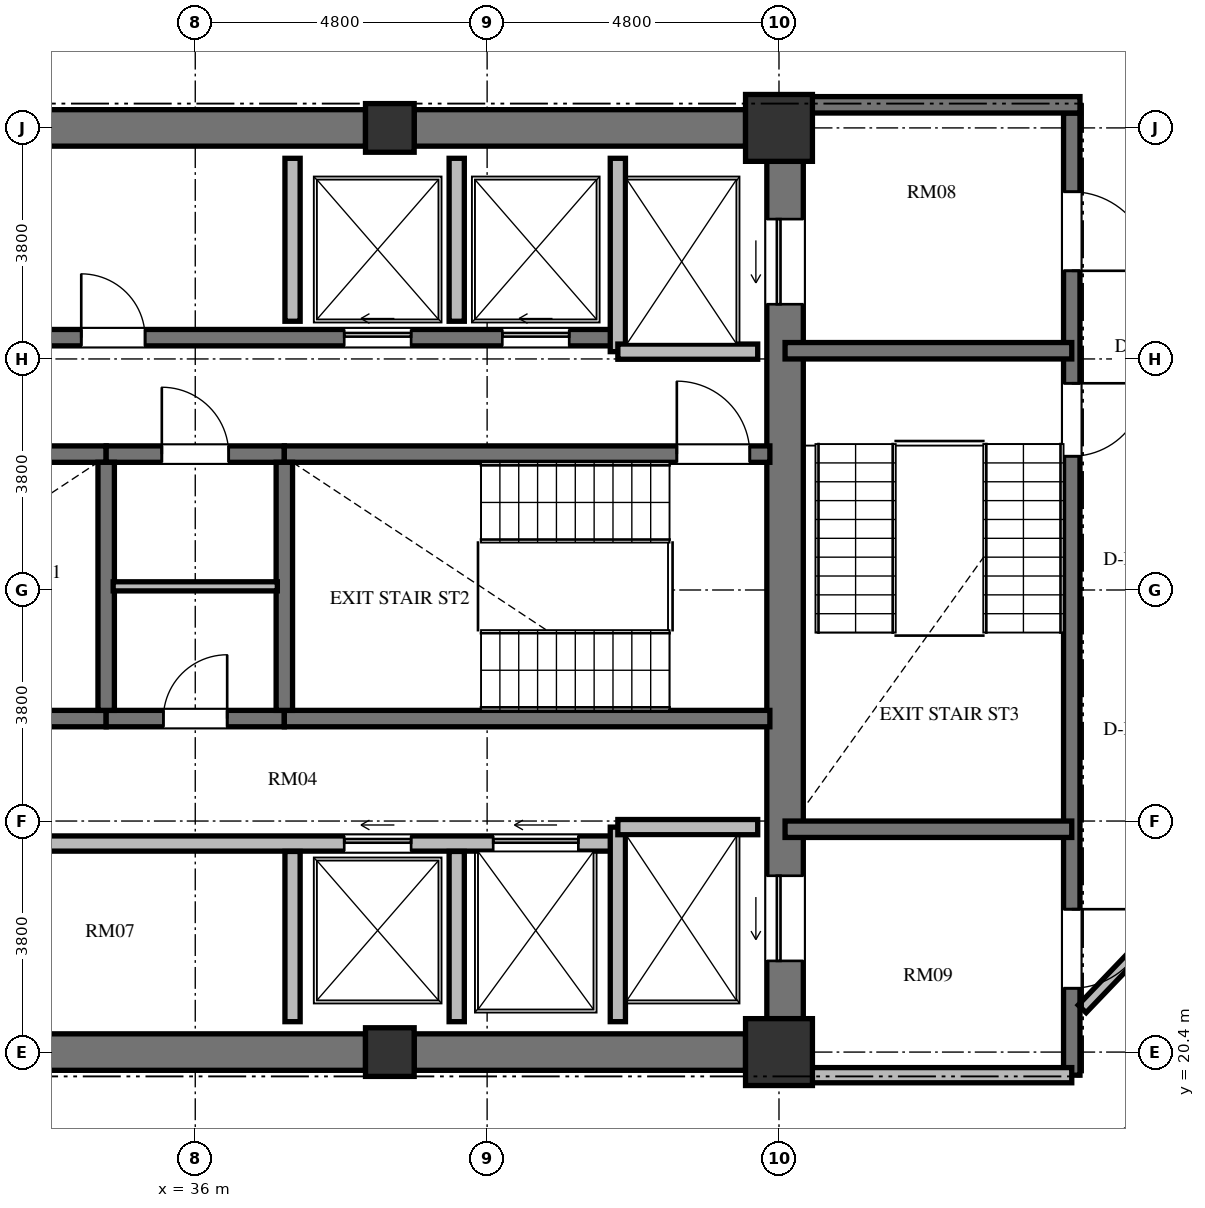
"""IFC4 building model, lengths in metres.
Left out: names, types, materials, properties, quantities, classifications, styles, units other than length and angle.
Written with IfcOpenShell. Run it as: python <this file> out.ifc"""

import sys

from ifc_helpers import new_model, si_unit, direction, frame, frame_2d, origin, origin_2d, place, context, subcontext, project, spatial, rectangle, extrude, element, fill, save


model = new_model("IFC4")
c1 = context("Model", 3, precision=1e-05, world=origin(), true_north=direction((0.0, 1.0)))
c2 = subcontext(c1, "Body", "Model", "MODEL_VIEW")
j1 = project(units=[si_unit("LENGTHUNIT", "METRE"), si_unit("PLANEANGLEUNIT", "RADIAN")], contexts=[c1])
p1 = place(None, origin())
s1 = spatial("IfcSite", under=j1, at=p1, CompositionType="ELEMENT")
p2 = place(p1, origin())
s2 = spatial("IfcBuilding", under=s1, at=p2, CompositionType="ELEMENT")
p3 = place(p2, frame((0.0, 0.0, 202.128)))
s3 = spatial("IfcBuildingStorey", under=s2, at=p3, CompositionType="ELEMENT", Elevation=202.128)
p4 = place(p3, frame((39.2, 20.4, 0.0), z_axis=(0.0, 0.0, 1.0), x_axis=(1.0, 0.0, 0.0)))
e1 = element("IfcColumn", 1, at=p4, inside=s3, PredefinedType="COLUMN", context=c2, shape_type="SweptSolid", body=[
    extrude(rectangle(XDim=0.8, YDim=0.8, at=origin_2d()), origin(), (0.0, 0.0, 1.0), 3.648),
])
for number, where, z_axis, x_axis in (
    (2, (45.6, 20.4, 0.0), (0.0, 0.0, 1.0), (1.0, 0.0, 0.0)),
    (3, (45.6, 35.6, 0.0), (0.0, 0.0, 1.0), (1.0, 0.0, 0.0)),
):
    element("IfcColumn", number, at=place(p3, frame(where, z_axis=z_axis, x_axis=x_axis)), inside=s3, PredefinedType="COLUMN", context=c2, shape_type="SweptSolid", body=[
        extrude(rectangle(XDim=1.1, YDim=1.1, at=origin_2d()), origin(), (0.0, 0.0, 1.0), 3.648),
    ])
p5 = place(p3, frame((39.2, 35.6, 0.0), z_axis=(0.0, 0.0, 1.0), x_axis=(1.0, 0.0, 0.0)))
e4 = element("IfcColumn", 4, at=p5, inside=s3, PredefinedType="COLUMN", context=c2, shape_type="SweptSolid", body=[
    extrude(rectangle(XDim=0.8, YDim=0.8, at=origin_2d()), origin(), (0.0, 0.0, 1.0), 3.648),
])
p6 = place(p3, frame((45.7, 20.95, 0.0), z_axis=(0.0, 0.0, 1.0), x_axis=(0.0, 1.0, 0.0)))
e5 = element("IfcWall", 5, at=p6, inside=s3, PredefinedType="SHEAR", context=c2, shape_type="SweptSolid", body=[
    extrude(rectangle(XDim=14.1, YDim=0.6, at=frame_2d((7.05, 0.0))), origin(), (0.0, 0.0, 1.0), 3.648),
])
p7 = place(p6, frame((11.75, 0.0, 0.0)))
e6 = element("IfcOpeningElement", 6, at=p7, cuts=e5, PredefinedType="OPENING", context=c2, shape_type="SweptSolid", body=[
    extrude(rectangle(XDim=1.4, YDim=2.3, at=frame_2d((0.7, 1.15))), frame((0.0, 0.31, 0.0), z_axis=(0.0, -1.0, 0.0), x_axis=(1.0, 0.0, 0.0)), (0.0, 0.0, 1.0), 0.62),
])
p8 = place(p6, frame((0.95, 0.0, 0.0)))
e7 = element("IfcOpeningElement", 7, at=p8, cuts=e5, PredefinedType="OPENING", context=c2, shape_type="SweptSolid", body=[
    extrude(rectangle(XDim=1.4, YDim=2.3, at=frame_2d((0.7, 1.15))), frame((0.0, 0.31, 0.0), z_axis=(0.0, -1.0, 0.0), x_axis=(1.0, 0.0, 0.0)), (0.0, 0.0, 1.0), 0.62),
])
for number, where, z_axis, x_axis in (
    (8, (33.2, 20.4, 0.0), (0.0, 0.0, 1.0), (1.0, 0.0, 0.0)),
    (9, (33.2, 35.6, 0.0), (0.0, 0.0, 1.0), (1.0, 0.0, 0.0)),
):
    element("IfcWall", number, at=place(p3, frame(where, z_axis=z_axis, x_axis=x_axis)), inside=s3, PredefinedType="SHEAR", context=c2, shape_type="SweptSolid", body=[
        extrude(rectangle(XDim=5.6, YDim=0.6, at=frame_2d((2.8, 0.0))), origin(), (0.0, 0.0, 1.0), 3.648),
    ])
for number, where, z_axis, x_axis in (
    (10, (39.6, 20.4, 0.0), (0.0, 0.0, 1.0), (1.0, 0.0, 0.0)),
    (11, (39.6, 35.6, 0.0), (0.0, 0.0, 1.0), (1.0, 0.0, 0.0)),
):
    element("IfcWall", number, at=place(p3, frame(where, z_axis=z_axis, x_axis=x_axis)), inside=s3, PredefinedType="SHEAR", context=c2, shape_type="SweptSolid", body=[
        extrude(rectangle(XDim=5.45, YDim=0.6, at=frame_2d((2.725, 0.0))), origin(), (0.0, 0.0, 1.0), 3.648),
    ])
p9 = place(p3, frame((26.55, 30.235, 0.0), z_axis=(0.0, 0.0, 1.0), x_axis=(1.0, 0.0, 0.0)))
e12 = element("IfcWall", 12, at=p9, inside=s3, PredefinedType="SHEAR", context=c2, shape_type="SweptSolid", body=[
    extrude(rectangle(XDim=7.985, YDim=0.27, at=frame_2d((3.992, 0.0))), origin(), (0.0, 0.0, 1.0), 3.648),
])
p10 = place(p3, frame((34.535, 30.235, 0.0), z_axis=(0.0, 0.0, 1.0), x_axis=(1.0, 0.0, 0.0)))
e13 = element("IfcWall", 13, at=p10, inside=s3, PredefinedType="SHEAR", context=c2, shape_type="SweptSolid", body=[
    extrude(rectangle(XDim=2.93, YDim=0.27, at=frame_2d((1.465, 0.0))), origin(), (0.0, 0.0, 1.0), 3.648),
])
p11 = place(p10, frame((0.915, 0.0, 0.0)))
e14 = element("IfcOpeningElement", 14, at=p11, cuts=e13, PredefinedType="OPENING", context=c2, shape_type="SweptSolid", body=[
    extrude(rectangle(XDim=1.1, YDim=2.15, at=frame_2d((0.55, 1.075))), frame((0.0, 0.145, 0.0), z_axis=(0.0, -1.0, 0.0), x_axis=(1.0, 0.0, 0.0)), (0.0, 0.0, 1.0), 0.29),
])
p12 = place(p3, frame((37.465, 30.235, 0.0), z_axis=(0.0, 0.0, 1.0), x_axis=(1.0, 0.0, 0.0)))
e15 = element("IfcWall", 15, at=p12, inside=s3, PredefinedType="SHEAR", context=c2, shape_type="SweptSolid", body=[
    extrude(rectangle(XDim=7.985, YDim=0.27, at=frame_2d((3.992, 0.0))), origin(), (0.0, 0.0, 1.0), 3.648),
])
p13 = place(p12, frame((6.455, 0.0, 0.0)))
e16 = element("IfcOpeningElement", 16, at=p13, cuts=e15, PredefinedType="OPENING", context=c2, shape_type="SweptSolid", body=[
    extrude(rectangle(XDim=1.2, YDim=2.15, at=frame_2d((0.6, 1.075))), frame((0.0, 0.145, 0.0), z_axis=(0.0, -1.0, 0.0), x_axis=(1.0, 0.0, 0.0)), (0.0, 0.0, 1.0), 0.29),
])
p14 = place(p3, frame((26.55, 25.885, 0.0), z_axis=(0.0, 0.0, 1.0), x_axis=(1.0, 0.0, 0.0)))
e17 = element("IfcWall", 17, at=p14, inside=s3, PredefinedType="SHEAR", context=c2, shape_type="SweptSolid", body=[
    extrude(rectangle(XDim=7.985, YDim=0.27, at=frame_2d((3.992, 0.0))), origin(), (0.0, 0.0, 1.0), 3.648),
])
p15 = place(p3, frame((34.535, 25.885, 0.0), z_axis=(0.0, 0.0, 1.0), x_axis=(1.0, 0.0, 0.0)))
e18 = element("IfcWall", 18, at=p15, inside=s3, PredefinedType="SHEAR", context=c2, shape_type="SweptSolid", body=[
    extrude(rectangle(XDim=2.93, YDim=0.27, at=frame_2d((1.465, 0.0))), origin(), (0.0, 0.0, 1.0), 3.648),
])
p16 = place(p15, frame((0.94, 0.0, 0.0)))
e19 = element("IfcOpeningElement", 19, at=p16, cuts=e18, PredefinedType="OPENING", context=c2, shape_type="SweptSolid", body=[
    extrude(rectangle(XDim=1.05, YDim=2.15, at=frame_2d((0.525, 1.075))), frame((0.0, 0.145, 0.0), z_axis=(0.0, -1.0, 0.0), x_axis=(1.0, 0.0, 0.0)), (0.0, 0.0, 1.0), 0.29),
])
p17 = place(p3, frame((37.465, 25.885, 0.0), z_axis=(0.0, 0.0, 1.0), x_axis=(1.0, 0.0, 0.0)))
e20 = element("IfcWall", 20, at=p17, inside=s3, PredefinedType="SHEAR", context=c2, shape_type="SweptSolid", body=[
    extrude(rectangle(XDim=7.985, YDim=0.27, at=frame_2d((3.992, 0.0))), origin(), (0.0, 0.0, 1.0), 3.648),
])
for number, where, z_axis, x_axis in (
    (21, (34.535, 26.02, 0.0), (0.0, 0.0, 1.0), (0.0, 1.0, 0.0)),
    (22, (37.465, 26.02, 0.0), (0.0, 0.0, 1.0), (0.0, 1.0, 0.0)),
):
    element("IfcWall", number, at=place(p3, frame(where, z_axis=z_axis, x_axis=x_axis)), inside=s3, PredefinedType="SHEAR", context=c2, shape_type="SweptSolid", body=[
        extrude(rectangle(XDim=4.08, YDim=0.27, at=frame_2d((2.04, 0.0))), origin(), (0.0, 0.0, 1.0), 3.648),
    ])
p18 = place(p3, frame((34.65, 28.06, 0.0), z_axis=(0.0, 0.0, 1.0), x_axis=(1.0, 0.0, 0.0)))
e23 = element("IfcWall", 23, at=p18, inside=s3, PredefinedType="PARTITIONING", context=c2, shape_type="SweptSolid", body=[
    extrude(rectangle(XDim=2.7, YDim=0.15, at=frame_2d((1.35, 0.0))), origin(), (0.0, 0.0, 1.0), 3.448),
])
p19 = place(p3, frame((26.55, 32.15, 0.0), z_axis=(0.0, 0.0, 1.0), x_axis=(1.0, 0.0, 0.0)))
e24 = element("IfcWall", 24, at=p19, inside=s3, PredefinedType="SHEAR", context=c2, shape_type="SweptSolid", body=[
    extrude(rectangle(XDim=16.4, YDim=0.27, at=frame_2d((8.2, 0.0))), origin(), (0.0, 0.0, 1.0), 3.648),
])
p20 = place(p19, frame((2.175, 0.0, 0.0)))
e25 = element("IfcOpeningElement", 25, at=p20, cuts=e24, PredefinedType="OPENING", context=c2, shape_type="SweptSolid", body=[
    extrude(rectangle(XDim=1.05, YDim=2.15, at=frame_2d((0.525, 1.075))), frame((0.0, 0.145, 0.0), z_axis=(0.0, -1.0, 0.0), x_axis=(1.0, 0.0, 0.0)), (0.0, 0.0, 1.0), 0.29),
])
p21 = place(p19, frame((7.575, 0.0, 0.0)))
e26 = element("IfcOpeningElement", 26, at=p21, cuts=e24, PredefinedType="OPENING", context=c2, shape_type="SweptSolid", body=[
    extrude(rectangle(XDim=1.05, YDim=2.15, at=frame_2d((0.525, 1.075))), frame((0.0, 0.145, 0.0), z_axis=(0.0, -1.0, 0.0), x_axis=(1.0, 0.0, 0.0)), (0.0, 0.0, 1.0), 0.29),
])
p22 = place(p19, frame((11.9, 0.0, 0.0)))
e27 = element("IfcOpeningElement", 27, at=p22, cuts=e24, PredefinedType="OPENING", context=c2, shape_type="SweptSolid", body=[
    extrude(rectangle(XDim=1.1, YDim=2.2, at=frame_2d((0.55, 1.1))), frame((0.0, 0.145, 0.0), z_axis=(0.0, -1.0, 0.0), x_axis=(1.0, 0.0, 0.0)), (0.0, 0.0, 1.0), 0.29),
])
p23 = place(p19, frame((14.5, 0.0, 0.0)))
e28 = element("IfcOpeningElement", 28, at=p23, cuts=e24, PredefinedType="OPENING", context=c2, shape_type="SweptSolid", body=[
    extrude(rectangle(XDim=1.1, YDim=2.2, at=frame_2d((0.55, 1.1))), frame((0.0, 0.145, 0.0), z_axis=(0.0, -1.0, 0.0), x_axis=(1.0, 0.0, 0.0)), (0.0, 0.0, 1.0), 0.29),
])
p24 = place(p3, frame((26.75, 23.83, 0.0), z_axis=(0.0, 0.0, 1.0), x_axis=(1.0, 0.0, 0.0)))
e29 = element("IfcWall", 29, at=p24, inside=s3, PredefinedType="SOLIDWALL", context=c2, shape_type="SweptSolid", body=[
    extrude(rectangle(XDim=16.2, YDim=0.25, at=frame_2d((8.1, 0.0))), origin(), (0.0, 0.0, 1.0), 3.448),
])
p25 = place(p24, frame((4.75, 0.0, 0.0)))
e30 = element("IfcOpeningElement", 30, at=p25, cuts=e29, PredefinedType="OPENING", context=c2, shape_type="SweptSolid", body=[
    extrude(rectangle(XDim=1.4, YDim=2.2, at=frame_2d((0.7, 1.1))), frame((0.0, 0.135, 0.0), z_axis=(0.0, -1.0, 0.0), x_axis=(1.0, 0.0, 0.0)), (0.0, 0.0, 1.0), 0.27),
])
p26 = place(p24, frame((11.7, 0.0, 0.0)))
e31 = element("IfcOpeningElement", 31, at=p26, cuts=e29, PredefinedType="OPENING", context=c2, shape_type="SweptSolid", body=[
    extrude(rectangle(XDim=1.1, YDim=2.2, at=frame_2d((0.55, 1.1))), frame((0.0, 0.135, 0.0), z_axis=(0.0, -1.0, 0.0), x_axis=(1.0, 0.0, 0.0)), (0.0, 0.0, 1.0), 0.27),
])
p27 = place(p24, frame((14.15, 0.0, 0.0)))
e32 = element("IfcOpeningElement", 32, at=p27, cuts=e29, PredefinedType="OPENING", context=c2, shape_type="SweptSolid", body=[
    extrude(rectangle(XDim=1.4, YDim=2.3, at=frame_2d((0.7, 1.15))), frame((0.0, 0.135, 0.0), z_axis=(0.0, -1.0, 0.0), x_axis=(1.0, 0.0, 0.0)), (0.0, 0.0, 1.0), 0.27),
])
p28 = place(p3, frame((42.95, 31.92, 0.0), z_axis=(0.0, 0.0, 1.0), x_axis=(0.0, 1.0, 0.0)))
e33 = element("IfcWall", 33, at=p28, inside=s3, PredefinedType="SOLIDWALL", context=c2, shape_type="SweptSolid", body=[
    extrude(rectangle(XDim=3.18, YDim=0.25, at=frame_2d((1.59, 0.0))), origin(), (0.0, 0.0, 1.0), 3.448),
])
p29 = place(p3, frame((42.95, 31.92, 0.0), z_axis=(0.0, 0.0, 1.0), x_axis=(1.0, 0.0, 0.0)))
e34 = element("IfcWall", 34, at=p29, inside=s3, PredefinedType="SOLIDWALL", context=c2, shape_type="SweptSolid", body=[
    extrude(rectangle(XDim=2.3, YDim=0.25, at=frame_2d((1.15, 0.0))), origin(), (0.0, 0.0, 1.0), 3.448),
])
p30 = place(p3, frame((42.95, 20.9, 0.0), z_axis=(0.0, 0.0, 1.0), x_axis=(0.0, 1.0, 0.0)))
e35 = element("IfcWall", 35, at=p30, inside=s3, PredefinedType="SOLIDWALL", context=c2, shape_type="SweptSolid", body=[
    extrude(rectangle(XDim=3.2, YDim=0.25, at=frame_2d((1.6, 0.0))), origin(), (0.0, 0.0, 1.0), 3.448),
])
p31 = place(p3, frame((42.95, 24.1, 0.0), z_axis=(0.0, 0.0, 1.0), x_axis=(1.0, 0.0, 0.0)))
e36 = element("IfcWall", 36, at=p31, inside=s3, PredefinedType="SOLIDWALL", context=c2, shape_type="SweptSolid", body=[
    extrude(rectangle(XDim=2.3, YDim=0.25, at=frame_2d((1.15, 0.0))), origin(), (0.0, 0.0, 1.0), 3.448),
])
p32 = place(p3, frame((37.6, 32.42, 0.0), z_axis=(0.0, 0.0, 1.0), x_axis=(0.0, 1.0, 0.0)))
e37 = element("IfcWall", 37, at=p32, inside=s3, PredefinedType="SOLIDWALL", context=c2, shape_type="SweptSolid", body=[
    extrude(rectangle(XDim=2.68, YDim=0.25, at=frame_2d((1.34, 0.0))), origin(), (0.0, 0.0, 1.0), 3.448),
])
p33 = place(p3, frame((37.6, 20.9, 0.0), z_axis=(0.0, 0.0, 1.0), x_axis=(0.0, 1.0, 0.0)))
e38 = element("IfcWall", 38, at=p33, inside=s3, PredefinedType="SOLIDWALL", context=c2, shape_type="SweptSolid", body=[
    extrude(rectangle(XDim=2.8, YDim=0.25, at=frame_2d((1.4, 0.0))), origin(), (0.0, 0.0, 1.0), 3.448),
])
p34 = place(p3, frame((40.3, 32.42, 0.0), z_axis=(0.0, 0.0, 1.0), x_axis=(0.0, 1.0, 0.0)))
e39 = element("IfcWall", 39, at=p34, inside=s3, PredefinedType="SOLIDWALL", context=c2, shape_type="SweptSolid", body=[
    extrude(rectangle(XDim=2.68, YDim=0.25, at=frame_2d((1.34, 0.0))), origin(), (0.0, 0.0, 1.0), 3.448),
])
p35 = place(p3, frame((40.3, 20.9, 0.0), z_axis=(0.0, 0.0, 1.0), x_axis=(0.0, 1.0, 0.0)))
e40 = element("IfcWall", 40, at=p35, inside=s3, PredefinedType="SOLIDWALL", context=c2, shape_type="SweptSolid", body=[
    extrude(rectangle(XDim=2.8, YDim=0.25, at=frame_2d((1.4, 0.0))), origin(), (0.0, 0.0, 1.0), 3.448),
])
p36 = place(p3, frame((50.415, 35.845, 0.0), z_axis=(0.0, 0.0, 1.0), x_axis=(0.0, -1.0, 0.0)))
e41 = element("IfcWall", 41, at=p36, inside=s3, PredefinedType="SHEAR", context=c2, shape_type="SweptSolid", body=[
    extrude(rectangle(XDim=15.825, YDim=0.27, at=frame_2d((7.913, 0.0))), origin(), (0.0, 0.0, 1.0), 3.648),
])
p37 = place(p36, frame((4.445, 0.0, 0.0)))
e42 = element("IfcOpeningElement", 42, at=p37, cuts=e41, PredefinedType="OPENING", context=c2, shape_type="SweptSolid", body=[
    extrude(rectangle(XDim=1.2, YDim=2.15, at=frame_2d((0.6, 1.075))), frame((0.0, 0.145, 0.0), z_axis=(0.0, -1.0, 0.0), x_axis=(1.0, 0.0, 0.0)), (0.0, 0.0, 1.0), 0.29),
])
p38 = place(p36, frame((1.295, 0.0, 0.0)))
e43 = element("IfcOpeningElement", 43, at=p38, cuts=e41, PredefinedType="OPENING", context=c2, shape_type="SweptSolid", body=[
    extrude(rectangle(XDim=1.3, YDim=2.2, at=frame_2d((0.65, 1.1))), frame((0.0, 0.145, 0.0), z_axis=(0.0, -1.0, 0.0), x_axis=(1.0, 0.0, 0.0)), (0.0, 0.0, 1.0), 0.29),
])
p39 = place(p36, frame((13.095, 0.0, 0.0)))
e44 = element("IfcOpeningElement", 44, at=p39, cuts=e41, PredefinedType="OPENING", context=c2, shape_type="SweptSolid", body=[
    extrude(rectangle(XDim=1.3, YDim=2.2, at=frame_2d((0.65, 1.1))), frame((0.0, 0.145, 0.0), z_axis=(0.0, -1.0, 0.0), x_axis=(1.0, 0.0, 0.0)), (0.0, 0.0, 1.0), 0.29),
])
p40 = place(p3, frame((46.0, 35.98, 0.0), z_axis=(0.0, 0.0, 1.0), x_axis=(1.0, 0.0, 0.0)))
e45 = element("IfcWall", 45, at=p40, inside=s3, PredefinedType="SHEAR", context=c2, shape_type="SweptSolid", body=[
    extrude(rectangle(XDim=4.55, YDim=0.27, at=frame_2d((2.275, 0.0))), origin(), (0.0, 0.0, 1.0), 3.648),
])
for number, where, z_axis, x_axis in (
    (46, (45.7, 31.935, 0.0), (0.0, 0.0, 1.0), (1.0, 0.0, 0.0)),
    (47, (45.7, 24.065, 0.0), (0.0, 0.0, 1.0), (1.0, 0.0, 0.0)),
):
    element("IfcWall", number, at=place(p3, frame(where, z_axis=z_axis, x_axis=x_axis)), inside=s3, PredefinedType="SHEAR", context=c2, shape_type="SweptSolid", body=[
        extrude(rectangle(XDim=4.715, YDim=0.27, at=frame_2d((2.357, 0.0))), origin(), (0.0, 0.0, 1.0), 3.648),
    ])
p41 = place(p3, frame((45.7, 20.02, 0.0), z_axis=(0.0, 0.0, 1.0), x_axis=(1.0, 0.0, 0.0)))
e48 = element("IfcWall", 48, at=p41, inside=s3, PredefinedType="SOLIDWALL", context=c2, shape_type="SweptSolid", body=[
    extrude(rectangle(XDim=4.715, YDim=0.25, at=frame_2d((2.357, 0.0))), origin(), (0.0, 0.0, 1.0), 3.448),
])
p42 = place(p3, frame((53.078, 23.714, 0.0), z_axis=(0.0, 0.0, 1.0), x_axis=(-0.691353379446, -0.722516785085, 0.0)))
e49 = element("IfcWall", 49, at=p42, inside=s3, PredefinedType="PARTITIONING", context=c2, shape_type="SweptSolid", body=[
    extrude(rectangle(XDim=3.604, YDim=0.18, at=frame_2d((1.802, 0.0))), origin(), (0.0, 0.0, 1.0), 3.448),
])
p43 = place(p13, origin())
e50 = element("IfcDoor", 50, at=p43, inside=s3, OperationType="SINGLE_SWING_LEFT", PredefinedType="DOOR", context=c2, shape_type="SweptSolid", body=[
    extrude(rectangle(XDim=1.2, YDim=2.15, at=frame_2d((0.6, 1.075))), frame((0.0, 0.025, 0.0), z_axis=(0.0, -1.0, 0.0), x_axis=(1.0, 0.0, 0.0)), (0.0, 0.0, 1.0), 0.05),
])
fill(e16, e50)
p44 = place(p16, origin())
e51 = element("IfcDoor", 51, at=p44, inside=s3, OperationType="SINGLE_SWING_RIGHT", PredefinedType="DOOR", context=c2, shape_type="SweptSolid", body=[
    extrude(rectangle(XDim=1.05, YDim=2.15, at=frame_2d((0.525, 1.075))), frame((0.0, 0.025, 0.0), z_axis=(0.0, -1.0, 0.0), x_axis=(1.0, 0.0, 0.0)), (0.0, 0.0, 1.0), 0.05),
])
fill(e19, e51)
p45 = place(p11, origin())
e52 = element("IfcDoor", 52, at=p45, inside=s3, OperationType="SINGLE_SWING_LEFT", PredefinedType="DOOR", context=c2, shape_type="SweptSolid", body=[
    extrude(rectangle(XDim=1.1, YDim=2.15, at=frame_2d((0.55, 1.075))), frame((0.0, 0.025, 0.0), z_axis=(0.0, -1.0, 0.0), x_axis=(1.0, 0.0, 0.0)), (0.0, 0.0, 1.0), 0.05),
])
fill(e14, e52)
p46 = place(p21, origin())
e53 = element("IfcDoor", 53, at=p46, inside=s3, OperationType="SINGLE_SWING_LEFT", PredefinedType="DOOR", context=c2, shape_type="SweptSolid", body=[
    extrude(rectangle(XDim=1.05, YDim=2.15, at=frame_2d((0.525, 1.075))), frame((0.0, 0.025, 0.0), z_axis=(0.0, -1.0, 0.0), x_axis=(1.0, 0.0, 0.0)), (0.0, 0.0, 1.0), 0.05),
])
fill(e26, e53)
p47 = place(p22, origin())
e54 = element("IfcDoor", 54, at=p47, inside=s3, OperationType="SLIDING_TO_LEFT", PredefinedType="DOOR", context=c2, shape_type="SweptSolid", body=[
    extrude(rectangle(XDim=1.1, YDim=2.2, at=frame_2d((0.55, 1.1))), frame((0.0, 0.025, 0.0), z_axis=(0.0, -1.0, 0.0), x_axis=(1.0, 0.0, 0.0)), (0.0, 0.0, 1.0), 0.05),
])
fill(e27, e54)
p48 = place(p23, origin())
e55 = element("IfcDoor", 55, at=p48, inside=s3, OperationType="SLIDING_TO_LEFT", PredefinedType="DOOR", context=c2, shape_type="SweptSolid", body=[
    extrude(rectangle(XDim=1.1, YDim=2.2, at=frame_2d((0.55, 1.1))), frame((0.0, 0.025, 0.0), z_axis=(0.0, -1.0, 0.0), x_axis=(1.0, 0.0, 0.0)), (0.0, 0.0, 1.0), 0.05),
])
fill(e28, e55)
p49 = place(p26, origin())
e56 = element("IfcDoor", 56, at=p49, inside=s3, OperationType="SLIDING_TO_LEFT", PredefinedType="DOOR", context=c2, shape_type="SweptSolid", body=[
    extrude(rectangle(XDim=1.1, YDim=2.2, at=frame_2d((0.55, 1.1))), frame((0.0, 0.025, 0.0), z_axis=(0.0, -1.0, 0.0), x_axis=(1.0, 0.0, 0.0)), (0.0, 0.0, 1.0), 0.05),
])
fill(e31, e56)
p50 = place(p7, origin())
e57 = element("IfcDoor", 57, at=p50, inside=s3, OperationType="SLIDING_TO_LEFT", PredefinedType="DOOR", context=c2, shape_type="SweptSolid", body=[
    extrude(rectangle(XDim=1.4, YDim=2.3, at=frame_2d((0.7, 1.15))), frame((0.0, 0.025, 0.0), z_axis=(0.0, -1.0, 0.0), x_axis=(1.0, 0.0, 0.0)), (0.0, 0.0, 1.0), 0.05),
])
fill(e6, e57)
p51 = place(p8, origin())
e58 = element("IfcDoor", 58, at=p51, inside=s3, OperationType="SLIDING_TO_LEFT", PredefinedType="DOOR", context=c2, shape_type="SweptSolid", body=[
    extrude(rectangle(XDim=1.4, YDim=2.3, at=frame_2d((0.7, 1.15))), frame((0.0, 0.025, 0.0), z_axis=(0.0, -1.0, 0.0), x_axis=(1.0, 0.0, 0.0)), (0.0, 0.0, 1.0), 0.05),
])
fill(e7, e58)
p52 = place(p27, origin())
e59 = element("IfcDoor", 59, at=p52, inside=s3, OperationType="SLIDING_TO_LEFT", PredefinedType="DOOR", context=c2, shape_type="SweptSolid", body=[
    extrude(rectangle(XDim=1.4, YDim=2.3, at=frame_2d((0.7, 1.15))), frame((0.0, 0.025, 0.0), z_axis=(0.0, -1.0, 0.0), x_axis=(1.0, 0.0, 0.0)), (0.0, 0.0, 1.0), 0.05),
])
fill(e32, e59)
p53 = place(p37, origin())
e60 = element("IfcDoor", 60, at=p53, inside=s3, OperationType="SINGLE_SWING_LEFT", PredefinedType="DOOR", context=c2, shape_type="SweptSolid", body=[
    extrude(rectangle(XDim=1.2, YDim=2.15, at=frame_2d((0.6, 1.075))), frame((0.0, 0.025, 0.0), z_axis=(0.0, -1.0, 0.0), x_axis=(1.0, 0.0, 0.0)), (0.0, 0.0, 1.0), 0.05),
])
fill(e42, e60)
p54 = place(p38, origin())
e61 = element("IfcDoor", 61, at=p54, inside=s3, OperationType="SINGLE_SWING_RIGHT", PredefinedType="DOOR", context=c2, shape_type="SweptSolid", body=[
    extrude(rectangle(XDim=1.3, YDim=2.2, at=frame_2d((0.65, 1.1))), frame((0.0, 0.025, 0.0), z_axis=(0.0, -1.0, 0.0), x_axis=(1.0, 0.0, 0.0)), (0.0, 0.0, 1.0), 0.05),
])
fill(e43, e61)
p55 = place(p39, origin())
e62 = element("IfcDoor", 62, at=p55, inside=s3, OperationType="SINGLE_SWING_LEFT", PredefinedType="DOOR", context=c2, shape_type="SweptSolid", body=[
    extrude(rectangle(XDim=1.3, YDim=2.2, at=frame_2d((0.65, 1.1))), frame((0.0, 0.025, 0.0), z_axis=(0.0, -1.0, 0.0), x_axis=(1.0, 0.0, 0.0)), (0.0, 0.0, 1.0), 0.05),
])
fill(e44, e62)
save(model, sys.argv[1])
